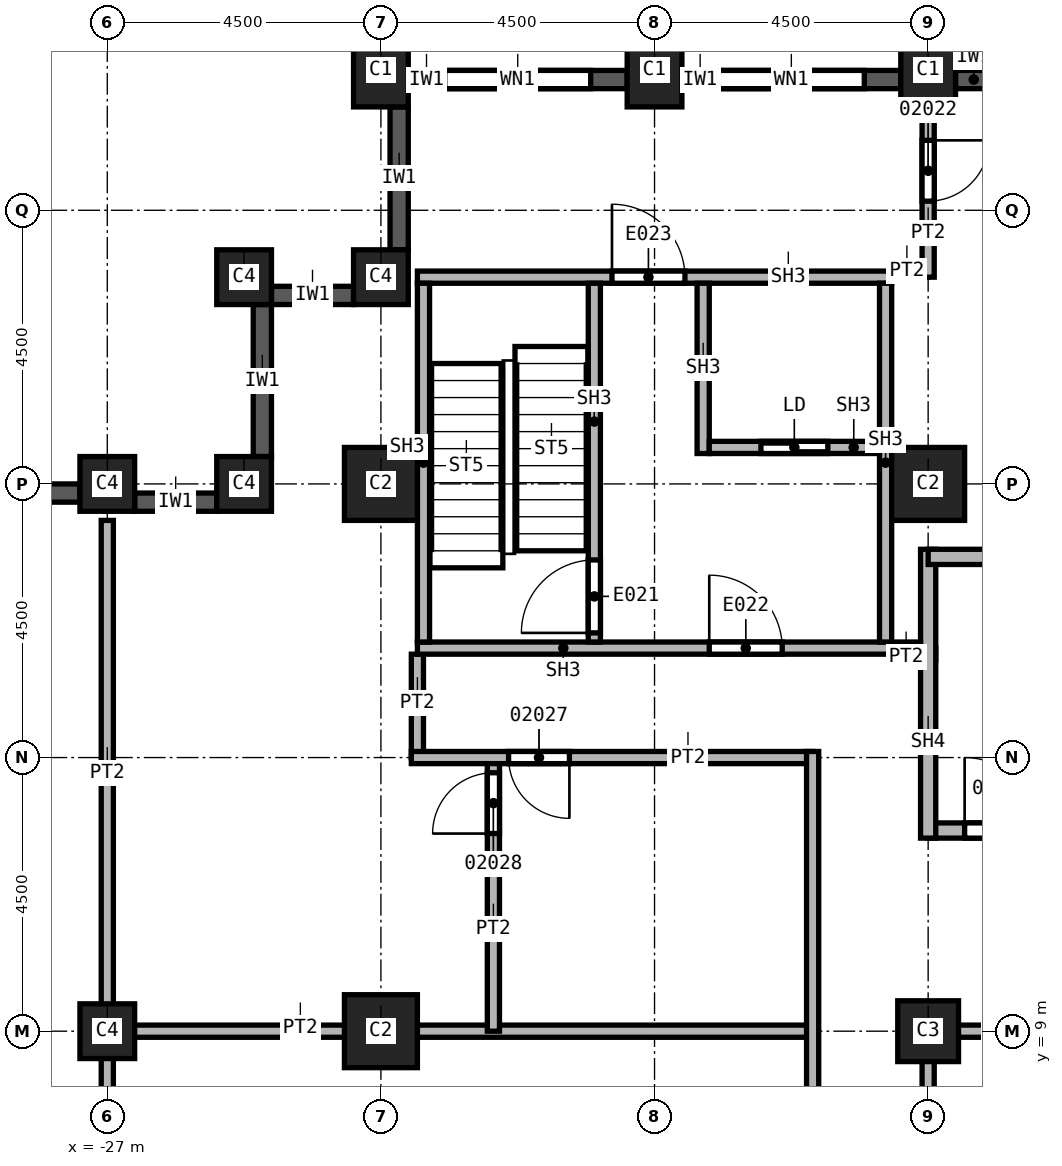
"""IFC4 building model, lengths in metres.
Left out: names, types, materials, properties, quantities, classifications, styles, units other than length and angle.
Written with IfcOpenShell. Run it as: python <this file> out.ifc"""

import sys

from ifc_helpers import new_model, si_unit, direction, frame, frame_2d, origin, origin_2d, place, context, subcontext, project, spatial, rectangle, extrude, element, fill, save


model = new_model("IFC4")
c1 = context("Model", 3, precision=1e-05, world=origin(), true_north=direction((0.0, 1.0)))
c2 = subcontext(c1, "Body", "Model", "MODEL_VIEW")
j1 = project(units=[si_unit("LENGTHUNIT", "METRE"), si_unit("PLANEANGLEUNIT", "RADIAN")], contexts=[c1])
p1 = place(None, origin())
s1 = spatial("IfcSite", under=j1, at=p1, CompositionType="ELEMENT")
p2 = place(p1, origin())
s2 = spatial("IfcBuilding", under=s1, at=p2, CompositionType="ELEMENT")
p3 = place(p2, frame((0.0, 0.0, 80.0)))
s3 = spatial("IfcBuildingStorey", under=s2, at=p3, CompositionType="ELEMENT", Elevation=80.0)
for number, where, z_axis, x_axis in (
    (1, (-13.5, 18.0, 0.0), (0.0, 0.0, 1.0), (1.0, 0.0, 0.0)),
    (2, (-22.5, 9.0, 0.0), (0.0, 0.0, 1.0), (1.0, 0.0, 0.0)),
    (3, (-22.5, 18.0, 0.0), (0.0, 0.0, 1.0), (1.0, 0.0, 0.0)),
):
    element("IfcColumn", number, at=place(p3, frame(where, z_axis=z_axis, x_axis=x_axis)), inside=s3, PredefinedType="COLUMN", context=c2, shape_type="SweptSolid", body=[
        extrude(rectangle(XDim=1.2, YDim=1.2, at=origin_2d()), origin(), (0.0, 0.0, 1.0), 3.7),
    ])
p4 = place(p3, frame((-13.5, 9.0, 0.0), z_axis=(0.0, 0.0, 1.0), x_axis=(1.0, 0.0, 0.0)))
e4 = element("IfcColumn", 4, at=p4, inside=s3, PredefinedType="COLUMN", context=c2, shape_type="SweptSolid", body=[
    extrude(rectangle(XDim=1.0, YDim=1.0, at=origin_2d()), origin(), (0.0, 0.0, 1.0), 3.7),
])
for number, where, z_axis, x_axis in (
    (5, (-13.5, 24.8, 0.0), (0.0, 0.0, 1.0), (1.0, 0.0, 0.0)),
    (6, (-18.0, 24.8, 0.0), (0.0, 0.0, 1.0), (1.0, 0.0, 0.0)),
    (7, (-22.5, 24.8, 0.0), (0.0, 0.0, 1.0), (1.0, 0.0, 0.0)),
):
    element("IfcColumn", number, at=place(p3, frame(where, z_axis=z_axis, x_axis=x_axis)), inside=s3, PredefinedType="COLUMN", context=c2, shape_type="SweptSolid", body=[
        extrude(rectangle(XDim=0.9, YDim=1.2, at=origin_2d()), origin(), (0.0, 0.0, 1.0), 3.7),
    ])
for number, where, z_axis, x_axis in (
    (8, (-27.0, 9.0, 0.0), (0.0, 0.0, 1.0), (1.0, 0.0, 0.0)),
    (9, (-27.0, 18.0, 0.0), (0.0, 0.0, 1.0), (1.0, 0.0, 0.0)),
    (10, (-22.5, 21.4, 0.0), (0.0, 0.0, 1.0), (1.0, 0.0, 0.0)),
    (11, (-24.75, 21.4, 0.0), (0.0, 0.0, 1.0), (1.0, 0.0, 0.0)),
    (12, (-24.75, 18.0, 0.0), (0.0, 0.0, 1.0), (1.0, 0.0, 0.0)),
):
    element("IfcColumn", number, at=place(p3, frame(where, z_axis=z_axis, x_axis=x_axis)), inside=s3, PredefinedType="COLUMN", context=c2, shape_type="SweptSolid", body=[
        extrude(rectangle(XDim=0.9, YDim=0.9, at=origin_2d()), origin(), (0.0, 0.0, 1.0), 3.7),
    ])
p5 = place(p3, frame((-22.2, 24.2, 0.0), z_axis=(0.0, 0.0, 1.0), x_axis=(0.0, -1.0, 0.0)))
e13 = element("IfcWall", 13, at=p5, inside=s3, PredefinedType="SOLIDWALL", context=c2, shape_type="SweptSolid", body=[
    extrude(rectangle(XDim=2.35, YDim=0.3, at=frame_2d((1.175, 0.0))), origin(), (0.0, 0.0, 1.0), 3.1),
])
p6 = place(p3, frame((-22.95, 21.1, 0.0), z_axis=(0.0, 0.0, 1.0), x_axis=(-1.0, 0.0, 0.0)))
e14 = element("IfcWall", 14, at=p6, inside=s3, PredefinedType="SOLIDWALL", context=c2, shape_type="SweptSolid", body=[
    extrude(rectangle(XDim=1.35, YDim=0.3, at=frame_2d((0.675, 0.0))), origin(), (0.0, 0.0, 1.0), 3.1),
])
p7 = place(p3, frame((-24.45, 20.95, 0.0), z_axis=(0.0, 0.0, 1.0), x_axis=(0.0, -1.0, 0.0)))
e15 = element("IfcWall", 15, at=p7, inside=s3, PredefinedType="SOLIDWALL", context=c2, shape_type="SweptSolid", body=[
    extrude(rectangle(XDim=2.5, YDim=0.3, at=frame_2d((1.25, 0.0))), origin(), (0.0, 0.0, 1.0), 3.1),
])
p8 = place(p3, frame((-25.2, 17.7, 0.0), z_axis=(0.0, 0.0, 1.0), x_axis=(-1.0, 0.0, 0.0)))
e16 = element("IfcWall", 16, at=p8, inside=s3, PredefinedType="SOLIDWALL", context=c2, shape_type="SweptSolid", body=[
    extrude(rectangle(XDim=1.35, YDim=0.3, at=frame_2d((0.675, 0.0))), origin(), (0.0, 0.0, 1.0), 3.1),
])
p9 = place(p3, frame((-27.45, 17.85, 0.0), z_axis=(0.0, 0.0, 1.0), x_axis=(-1.0, 0.0, 0.0)))
e17 = element("IfcWall", 17, at=p9, inside=s3, PredefinedType="SOLIDWALL", context=c2, shape_type="SweptSolid", body=[
    extrude(rectangle(XDim=3.6, YDim=0.3, at=frame_2d((1.8, 0.0))), origin(), (0.0, 0.0, 1.0), 3.1),
])
p10 = place(p9, frame((0.6, 0.0, 0.8)))
e18 = element("IfcOpeningElement", 18, at=p10, cuts=e17, PredefinedType="OPENING", context=c2, shape_type="SweptSolid", body=[
    extrude(rectangle(XDim=2.4, YDim=1.95, at=frame_2d((1.2, 0.975))), frame((0.0, 0.15, 0.0), z_axis=(0.0, -1.0, 0.0), x_axis=(1.0, 0.0, 0.0)), (0.0, 0.0, 1.0), 0.3),
])
p11 = place(p3, frame((-9.45, 24.65, 0.0), z_axis=(0.0, 0.0, 1.0), x_axis=(-1.0, 0.0, 0.0)))
e19 = element("IfcWall", 19, at=p11, inside=s3, PredefinedType="SOLIDWALL", context=c2, shape_type="SweptSolid", body=[
    extrude(rectangle(XDim=3.6, YDim=0.3, at=frame_2d((1.8, 0.0))), origin(), (0.0, 0.0, 1.0), 3.1),
])
p12 = place(p11, frame((0.6, 0.0, 0.8)))
e20 = element("IfcOpeningElement", 20, at=p12, cuts=e19, PredefinedType="OPENING", context=c2, shape_type="SweptSolid", body=[
    extrude(rectangle(XDim=2.4, YDim=1.95, at=frame_2d((1.2, 0.975))), frame((0.0, 0.15, 0.0), z_axis=(0.0, -1.0, 0.0), x_axis=(1.0, 0.0, 0.0)), (0.0, 0.0, 1.0), 0.3),
])
p13 = place(p3, frame((-13.95, 24.65, 0.0), z_axis=(0.0, 0.0, 1.0), x_axis=(-1.0, 0.0, 0.0)))
e21 = element("IfcWall", 21, at=p13, inside=s3, PredefinedType="SOLIDWALL", context=c2, shape_type="SweptSolid", body=[
    extrude(rectangle(XDim=3.6, YDim=0.3, at=frame_2d((1.8, 0.0))), origin(), (0.0, 0.0, 1.0), 3.1),
])
p14 = place(p13, frame((0.6, 0.0, 0.8)))
e22 = element("IfcOpeningElement", 22, at=p14, cuts=e21, PredefinedType="OPENING", context=c2, shape_type="SweptSolid", body=[
    extrude(rectangle(XDim=2.4, YDim=1.95, at=frame_2d((1.2, 0.975))), frame((0.0, 0.15, 0.0), z_axis=(0.0, -1.0, 0.0), x_axis=(1.0, 0.0, 0.0)), (0.0, 0.0, 1.0), 0.3),
])
p15 = place(p3, frame((-18.45, 24.65, 0.0), z_axis=(0.0, 0.0, 1.0), x_axis=(-1.0, 0.0, 0.0)))
e23 = element("IfcWall", 23, at=p15, inside=s3, PredefinedType="SOLIDWALL", context=c2, shape_type="SweptSolid", body=[
    extrude(rectangle(XDim=3.6, YDim=0.3, at=frame_2d((1.8, 0.0))), origin(), (0.0, 0.0, 1.0), 3.1),
])
p16 = place(p15, frame((0.6, 0.0, 0.8)))
e24 = element("IfcOpeningElement", 24, at=p16, cuts=e23, PredefinedType="OPENING", context=c2, shape_type="SweptSolid", body=[
    extrude(rectangle(XDim=2.4, YDim=1.95, at=frame_2d((1.2, 0.975))), frame((0.0, 0.15, 0.0), z_axis=(0.0, -1.0, 0.0), x_axis=(1.0, 0.0, 0.0)), (0.0, 0.0, 1.0), 0.3),
])
p17 = place(p3, frame((-27.1, 9.0, 0.0), z_axis=(0.0, 0.0, 1.0), x_axis=(1.0, 0.0, 0.0)))
e25 = element("IfcWall", 25, at=p17, inside=s3, PredefinedType="PARTITIONING", context=c2, shape_type="SweptSolid", body=[
    extrude(rectangle(XDim=11.7, YDim=0.2, at=frame_2d((5.85, 0.0))), origin(), (0.0, 0.0, 1.0), 3.7),
])
p18 = place(p3, frame((-27.0, 3.75, 0.0), z_axis=(0.0, 0.0, 1.0), x_axis=(0.0, 1.0, 0.0)))
e26 = element("IfcWall", 26, at=p18, inside=s3, PredefinedType="PARTITIONING", context=c2, shape_type="SweptSolid", body=[
    extrude(rectangle(XDim=13.65, YDim=0.2, at=frame_2d((6.825, 0.0))), origin(), (0.0, 0.0, 1.0), 3.7),
])
p19 = place(p3, frame((-21.9, 13.5, 0.0), z_axis=(0.0, 0.0, 1.0), x_axis=(0.0, 1.0, 0.0)))
e27 = element("IfcWall", 27, at=p19, inside=s3, PredefinedType="PARTITIONING", context=c2, shape_type="SweptSolid", body=[
    extrude(rectangle(XDim=1.7, YDim=0.2, at=frame_2d((0.85, 0.0))), origin(), (0.0, 0.0, 1.0), 3.7),
])
p20 = place(p3, frame((-20.65, 9.0, 0.0), z_axis=(0.0, 0.0, 1.0), x_axis=(0.0, 1.0, 0.0)))
e28 = element("IfcWall", 28, at=p20, inside=s3, PredefinedType="PARTITIONING", context=c2, shape_type="SweptSolid", body=[
    extrude(rectangle(XDim=4.5, YDim=0.2, at=frame_2d((2.25, 0.0))), origin(), (0.0, 0.0, 1.0), 3.7),
])
p21 = place(p20, frame((3.25, 0.0, 0.0)))
e29 = element("IfcOpeningElement", 29, at=p21, cuts=e28, PredefinedType="OPENING", context=c2, shape_type="SweptSolid", body=[
    extrude(rectangle(XDim=1.0, YDim=2.1, at=frame_2d((0.5, 1.05))), frame((0.0, 0.1, 0.0), z_axis=(0.0, -1.0, 0.0), x_axis=(1.0, 0.0, 0.0)), (0.0, 0.0, 1.0), 0.2),
])
p22 = place(p3, frame((-15.4, 13.5, 0.0), z_axis=(0.0, 0.0, 1.0), x_axis=(-1.0, 0.0, 0.0)))
e30 = element("IfcWall", 30, at=p22, inside=s3, PredefinedType="PARTITIONING", context=c2, shape_type="SweptSolid", body=[
    extrude(rectangle(XDim=6.6, YDim=0.2, at=frame_2d((3.3, 0.0))), origin(), (0.0, 0.0, 1.0), 3.7),
])
p23 = place(p22, frame((4.0, 0.0, 0.0)))
e31 = element("IfcOpeningElement", 31, at=p23, cuts=e30, PredefinedType="OPENING", context=c2, shape_type="SweptSolid", body=[
    extrude(rectangle(XDim=1.0, YDim=2.1, at=frame_2d((0.5, 1.05))), frame((0.0, 0.1, 0.0), z_axis=(0.0, -1.0, 0.0), x_axis=(1.0, 0.0, 0.0)), (0.0, 0.0, 1.0), 0.2),
])
p24 = place(p3, frame((-15.4, 3.65, 0.0), z_axis=(0.0, 0.0, 1.0), x_axis=(0.0, 1.0, 0.0)))
e32 = element("IfcWall", 32, at=p24, inside=s3, PredefinedType="PARTITIONING", context=c2, shape_type="SweptSolid", body=[
    extrude(rectangle(XDim=9.95, YDim=0.2, at=frame_2d((4.975, 0.0))), origin(), (0.0, 0.0, 1.0), 3.7),
])
p25 = place(p3, frame((-14.1, 15.2, 0.0), z_axis=(0.0, 0.0, 1.0), x_axis=(1.0, 0.0, 0.0)))
e33 = element("IfcWall", 33, at=p25, inside=s3, PredefinedType="PARTITIONING", context=c2, shape_type="SweptSolid", body=[
    extrude(rectangle(XDim=0.725, YDim=0.2, at=frame_2d((0.363, 0.0))), origin(), (0.0, 0.0, 1.0), 3.7),
])
p26 = place(p3, frame((-13.5, 21.5, 0.0), z_axis=(0.0, 0.0, 1.0), x_axis=(-1.0, 0.0, 0.0)))
e34 = element("IfcWall", 34, at=p26, inside=s3, PredefinedType="PARTITIONING", context=c2, shape_type="SweptSolid", body=[
    extrude(rectangle(XDim=0.6, YDim=0.2, at=frame_2d((0.3, 0.0))), origin(), (0.0, 0.0, 1.0), 3.7),
])
p27 = place(p3, frame((-13.5, 24.2, 0.0), z_axis=(0.0, 0.0, 1.0), x_axis=(0.0, -1.0, 0.0)))
e35 = element("IfcWall", 35, at=p27, inside=s3, PredefinedType="PARTITIONING", context=c2, shape_type="SweptSolid", body=[
    extrude(rectangle(XDim=2.8, YDim=0.2, at=frame_2d((1.4, 0.0))), origin(), (0.0, 0.0, 1.0), 3.7),
])
p28 = place(p27, frame((0.55, 0.0, 0.0)))
e36 = element("IfcOpeningElement", 36, at=p28, cuts=e35, PredefinedType="OPENING", context=c2, shape_type="SweptSolid", body=[
    extrude(rectangle(XDim=1.0, YDim=2.1, at=frame_2d((0.5, 1.05))), frame((0.0, 0.1, 0.0), z_axis=(0.0, -1.0, 0.0), x_axis=(1.0, 0.0, 0.0)), (0.0, 0.0, 1.0), 0.2),
])
p29 = place(p3, frame((-13.5, 6.0, 0.0), z_axis=(0.0, 0.0, 1.0), x_axis=(0.0, 1.0, 0.0)))
e37 = element("IfcWall", 37, at=p29, inside=s3, PredefinedType="SOLIDWALL", context=c2, shape_type="SweptSolid", body=[
    extrude(rectangle(XDim=3.1, YDim=0.2, at=frame_2d((1.55, 0.0))), origin(), (0.0, 0.0, 1.0), 2.938),
])
p30 = place(p3, frame((-13.5, 9.0, 0.0), z_axis=(0.0, 0.0, 1.0), x_axis=(1.0, 0.0, 0.0)))
e38 = element("IfcWall", 38, at=p30, inside=s3, PredefinedType="SOLIDWALL", context=c2, shape_type="SweptSolid", body=[
    extrude(rectangle(XDim=3.0, YDim=0.2, at=frame_2d((1.5, 0.0))), origin(), (0.0, 0.0, 1.0), 2.938),
])
p31 = place(p3, frame((-13.5, 12.3, 0.0), z_axis=(0.0, 0.0, 1.0), x_axis=(1.0, 0.0, 0.0)))
e39 = element("IfcWall", 39, at=p31, inside=s3, PredefinedType="SOLIDWALL", context=c2, shape_type="SweptSolid", body=[
    extrude(rectangle(XDim=9.125, YDim=0.25, at=frame_2d((4.562, 0.0))), origin(), (0.0, 0.0, 1.0), 3.7),
])
p32 = place(p31, frame((0.6, 0.0, 0.0)))
e40 = element("IfcOpeningElement", 40, at=p32, cuts=e39, PredefinedType="OPENING", context=c2, shape_type="SweptSolid", body=[
    extrude(rectangle(XDim=1.2, YDim=2.1, at=frame_2d((0.6, 1.05))), frame((0.0, 0.125, 0.0), z_axis=(0.0, -1.0, 0.0), x_axis=(1.0, 0.0, 0.0)), (0.0, 0.0, 1.0), 0.25),
])
p33 = place(p3, frame((-13.5, 12.175, 0.0), z_axis=(0.0, 0.0, 1.0), x_axis=(0.0, 1.0, 0.0)))
e41 = element("IfcWall", 41, at=p33, inside=s3, PredefinedType="SOLIDWALL", context=c2, shape_type="SweptSolid", body=[
    extrude(rectangle(XDim=4.75, YDim=0.25, at=frame_2d((2.375, 0.0))), origin(), (0.0, 0.0, 1.0), 3.7),
])
p34 = place(p3, frame((-13.5, 16.8, 0.0), z_axis=(0.0, 0.0, 1.0), x_axis=(1.0, 0.0, 0.0)))
e42 = element("IfcWall", 42, at=p34, inside=s3, PredefinedType="SOLIDWALL", context=c2, shape_type="SweptSolid", body=[
    extrude(rectangle(XDim=9.125, YDim=0.25, at=frame_2d((4.562, 0.0))), origin(), (0.0, 0.0, 1.0), 3.7),
])
p35 = place(p3, frame((-21.9, 15.3, 0.0), z_axis=(0.0, 0.0, 1.0), x_axis=(1.0, 0.0, 0.0)))
e43 = element("IfcWall", 43, at=p35, inside=s3, PredefinedType="SOLIDWALL", context=c2, shape_type="SweptSolid", body=[
    extrude(rectangle(XDim=8.275, YDim=0.2, at=frame_2d((4.137, 0.0))), origin(), (0.0, 0.0, 1.0), 3.7),
])
p36 = place(p35, frame((4.8, 0.0, 0.0)))
e44 = element("IfcOpeningElement", 44, at=p36, cuts=e43, PredefinedType="OPENING", context=c2, shape_type="SweptSolid", body=[
    extrude(rectangle(XDim=1.2, YDim=2.1, at=frame_2d((0.6, 1.05))), frame((0.0, 0.1, 0.0), z_axis=(0.0, -1.0, 0.0), x_axis=(1.0, 0.0, 0.0)), (0.0, 0.0, 1.0), 0.2),
])
p37 = place(p3, frame((-21.9, 21.4, 0.0), z_axis=(0.0, 0.0, 1.0), x_axis=(1.0, 0.0, 0.0)))
e45 = element("IfcWall", 45, at=p37, inside=s3, PredefinedType="SOLIDWALL", context=c2, shape_type="SweptSolid", body=[
    extrude(rectangle(XDim=7.8, YDim=0.2, at=frame_2d((3.9, 0.0))), origin(), (0.0, 0.0, 1.0), 3.7),
])
p38 = place(p37, frame((3.2, 0.0, 0.0)))
e46 = element("IfcOpeningElement", 46, at=p38, cuts=e45, PredefinedType="OPENING", context=c2, shape_type="SweptSolid", body=[
    extrude(rectangle(XDim=1.2, YDim=2.1, at=frame_2d((0.6, 1.05))), frame((0.0, 0.1, 0.0), z_axis=(0.0, -1.0, 0.0), x_axis=(1.0, 0.0, 0.0)), (0.0, 0.0, 1.0), 0.2),
])
for number, where, z_axis, x_axis in (
    (47, (-21.8, 15.4, 0.0), (0.0, 0.0, 1.0), (0.0, 1.0, 0.0)),
    (48, (-14.2, 15.4, 0.0), (0.0, 0.0, 1.0), (0.0, 1.0, 0.0)),
):
    element("IfcWall", number, at=place(p3, frame(where, z_axis=z_axis, x_axis=x_axis)), inside=s3, PredefinedType="SOLIDWALL", context=c2, shape_type="SweptSolid", body=[
        extrude(rectangle(XDim=5.9, YDim=0.2, at=frame_2d((2.95, 0.0))), origin(), (0.0, 0.0, 1.0), 3.7),
    ])
p39 = place(p3, frame((-18.99, 15.4, 0.0), z_axis=(0.0, 0.0, 1.0), x_axis=(0.0, 1.0, 0.0)))
e49 = element("IfcWall", 49, at=p39, inside=s3, PredefinedType="SOLIDWALL", context=c2, shape_type="SweptSolid", body=[
    extrude(rectangle(XDim=5.9, YDim=0.2, at=frame_2d((2.95, 0.0))), origin(), (0.0, 0.0, 1.0), 3.7),
])
p40 = place(p39, frame((0.15, 0.0, 0.0)))
e50 = element("IfcOpeningElement", 50, at=p40, cuts=e49, PredefinedType="OPENING", context=c2, shape_type="SweptSolid", body=[
    extrude(rectangle(XDim=1.2, YDim=2.1, at=frame_2d((0.6, 1.05))), frame((0.0, 0.1, 0.0), z_axis=(0.0, -1.0, 0.0), x_axis=(1.0, 0.0, 0.0)), (0.0, 0.0, 1.0), 0.2),
])
p41 = place(p3, frame((-17.2, 18.5, 0.0), z_axis=(0.0, 0.0, 1.0), x_axis=(0.0, 1.0, 0.0)))
e51 = element("IfcWall", 51, at=p41, inside=s3, PredefinedType="SOLIDWALL", context=c2, shape_type="SweptSolid", body=[
    extrude(rectangle(XDim=2.8, YDim=0.2, at=frame_2d((1.4, 0.0))), origin(), (0.0, 0.0, 1.0), 3.7),
])
p42 = place(p3, frame((-17.1, 18.6, 0.0), z_axis=(0.0, 0.0, 1.0), x_axis=(1.0, 0.0, 0.0)))
e52 = element("IfcWall", 52, at=p42, inside=s3, PredefinedType="SOLIDWALL", context=c2, shape_type="SweptSolid", body=[
    extrude(rectangle(XDim=2.8, YDim=0.2, at=frame_2d((1.4, 0.0))), origin(), (0.0, 0.0, 1.0), 3.7),
])
p43 = place(p42, frame((0.85, 0.0, 0.0)))
e53 = element("IfcOpeningElement", 53, at=p43, cuts=e52, PredefinedType="OPENING", context=c2, shape_type="SweptSolid", body=[
    extrude(rectangle(XDim=1.1, YDim=2.1, at=frame_2d((0.55, 1.05))), frame((0.0, 0.1, 0.0), z_axis=(0.0, -1.0, 0.0), x_axis=(1.0, 0.0, 0.0)), (0.0, 0.0, 1.0), 0.2),
])
p44 = place(p14, origin())
e54 = element("IfcWindow", 54, at=p44, inside=s3, PartitioningType="SINGLE_PANEL", PredefinedType="WINDOW", context=c2, shape_type="SweptSolid", body=[
    extrude(rectangle(XDim=2.4, YDim=1.95, at=frame_2d((1.2, 0.975))), frame((0.0, 0.03, 0.0), z_axis=(0.0, -1.0, 0.0), x_axis=(1.0, 0.0, 0.0)), (0.0, 0.0, 1.0), 0.06),
])
fill(e22, e54)
p45 = place(p16, origin())
e55 = element("IfcWindow", 55, at=p45, inside=s3, PartitioningType="SINGLE_PANEL", PredefinedType="WINDOW", context=c2, shape_type="SweptSolid", body=[
    extrude(rectangle(XDim=2.4, YDim=1.95, at=frame_2d((1.2, 0.975))), frame((0.0, 0.03, 0.0), z_axis=(0.0, -1.0, 0.0), x_axis=(1.0, 0.0, 0.0)), (0.0, 0.0, 1.0), 0.06),
])
fill(e24, e55)
p46 = place(p32, origin())
e56 = element("IfcDoor", 56, at=p46, inside=s3, OperationType="SINGLE_SWING_LEFT", PredefinedType="DOOR", context=c2, shape_type="SweptSolid", body=[
    extrude(rectangle(XDim=1.2, YDim=2.1, at=frame_2d((0.6, 1.05))), frame((0.0, 0.025, 0.0), z_axis=(0.0, -1.0, 0.0), x_axis=(1.0, 0.0, 0.0)), (0.0, 0.0, 1.0), 0.05),
])
fill(e40, e56)
p47 = place(p28, origin())
e57 = element("IfcDoor", 57, at=p47, inside=s3, OperationType="SINGLE_SWING_LEFT", PredefinedType="DOOR", context=c2, shape_type="SweptSolid", body=[
    extrude(rectangle(XDim=1.0, YDim=2.1, at=frame_2d((0.5, 1.05))), frame((0.0, 0.025, 0.0), z_axis=(0.0, -1.0, 0.0), x_axis=(1.0, 0.0, 0.0)), (0.0, 0.0, 1.0), 0.05),
])
fill(e36, e57)
p48 = place(p23, origin())
e58 = element("IfcDoor", 58, at=p48, inside=s3, OperationType="SINGLE_SWING_RIGHT", PredefinedType="DOOR", context=c2, shape_type="SweptSolid", body=[
    extrude(rectangle(XDim=1.0, YDim=2.1, at=frame_2d((0.5, 1.05))), frame((0.0, 0.025, 0.0), z_axis=(0.0, -1.0, 0.0), x_axis=(1.0, 0.0, 0.0)), (0.0, 0.0, 1.0), 0.05),
])
fill(e31, e58)
p49 = place(p21, origin())
e59 = element("IfcDoor", 59, at=p49, inside=s3, OperationType="SINGLE_SWING_LEFT", PredefinedType="DOOR", context=c2, shape_type="SweptSolid", body=[
    extrude(rectangle(XDim=1.0, YDim=2.1, at=frame_2d((0.5, 1.05))), frame((0.0, 0.025, 0.0), z_axis=(0.0, -1.0, 0.0), x_axis=(1.0, 0.0, 0.0)), (0.0, 0.0, 1.0), 0.05),
])
fill(e29, e59)
p50 = place(p40, origin())
e60 = element("IfcDoor", 60, at=p50, inside=s3, OperationType="SINGLE_SWING_LEFT", PredefinedType="DOOR", context=c2, shape_type="SweptSolid", body=[
    extrude(rectangle(XDim=1.2, YDim=2.1, at=frame_2d((0.6, 1.05))), frame((0.0, 0.025, 0.0), z_axis=(0.0, -1.0, 0.0), x_axis=(1.0, 0.0, 0.0)), (0.0, 0.0, 1.0), 0.05),
])
fill(e50, e60)
p51 = place(p43, origin())
e61 = element("IfcDoor", 61, at=p51, inside=s3, OperationType="SLIDING_TO_LEFT", PredefinedType="DOOR", context=c2, shape_type="SweptSolid", body=[
    extrude(rectangle(XDim=1.1, YDim=2.1, at=frame_2d((0.55, 1.05))), frame((0.0, 0.025, 0.0), z_axis=(0.0, -1.0, 0.0), x_axis=(1.0, 0.0, 0.0)), (0.0, 0.0, 1.0), 0.05),
])
fill(e53, e61)
p52 = place(p36, origin())
e62 = element("IfcDoor", 62, at=p52, inside=s3, OperationType="SINGLE_SWING_RIGHT", PredefinedType="DOOR", context=c2, shape_type="SweptSolid", body=[
    extrude(rectangle(XDim=1.2, YDim=2.1, at=frame_2d((0.6, 1.05))), frame((0.0, 0.025, 0.0), z_axis=(0.0, -1.0, 0.0), x_axis=(1.0, 0.0, 0.0)), (0.0, 0.0, 1.0), 0.05),
])
fill(e44, e62)
p53 = place(p38, origin())
e63 = element("IfcDoor", 63, at=p53, inside=s3, OperationType="SINGLE_SWING_LEFT", PredefinedType="DOOR", context=c2, shape_type="SweptSolid", body=[
    extrude(rectangle(XDim=1.2, YDim=2.1, at=frame_2d((0.6, 1.05))), frame((0.0, 0.025, 0.0), z_axis=(0.0, -1.0, 0.0), x_axis=(1.0, 0.0, 0.0)), (0.0, 0.0, 1.0), 0.05),
])
fill(e46, e63)
save(model, sys.argv[1])
